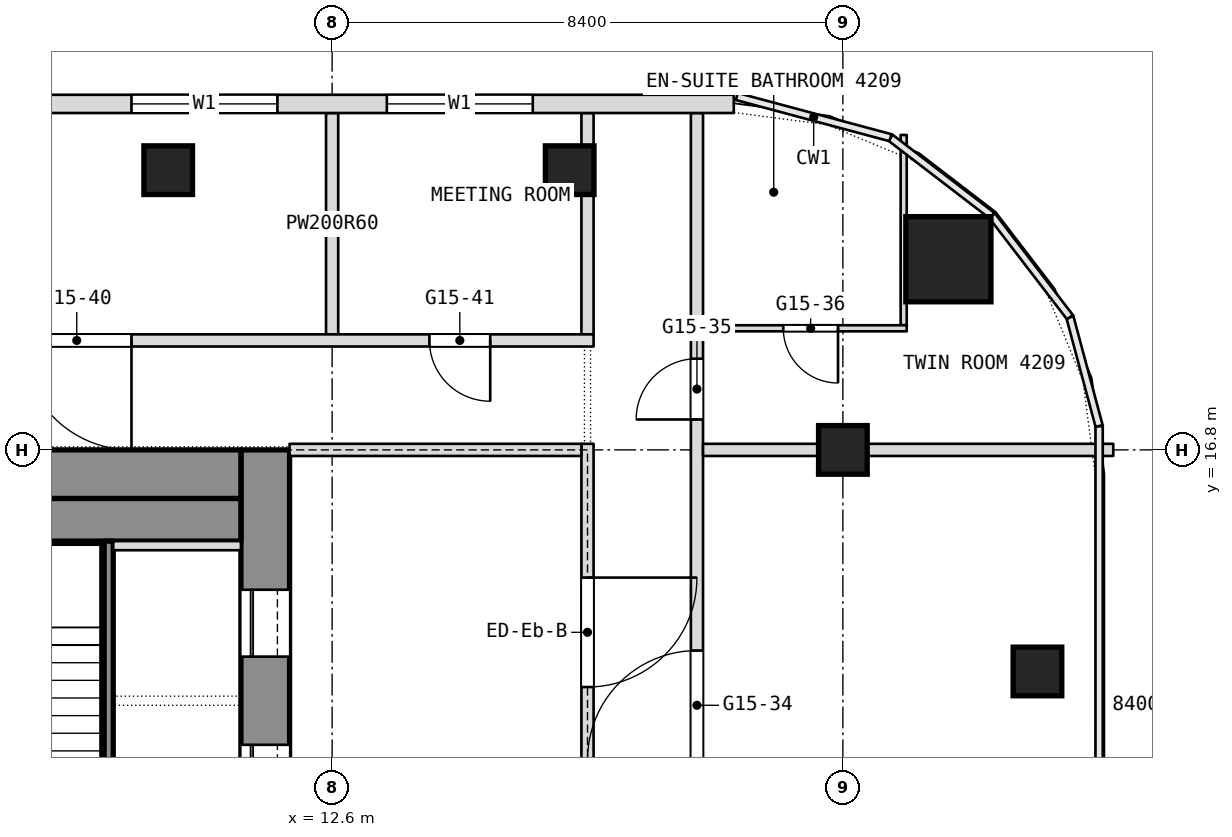
"""IFC4 building model, lengths in metres.
Left out: names, types, materials, properties, quantities, classifications, styles, units other than length and angle.
Written with IfcOpenShell. Run it as: python <this file> out.ifc"""

import sys

from ifc_helpers import new_model, si_unit, direction, frame, frame_2d, origin, origin_2d, place, context, subcontext, project, spatial, rectangle, extrude, element, fill, save


model = new_model("IFC4")
c1 = context("Model", 3, precision=1e-05, world=origin(), true_north=direction((0.0, 1.0)))
c2 = subcontext(c1, "Body", "Model", "MODEL_VIEW")
j1 = project(units=[si_unit("LENGTHUNIT", "METRE"), si_unit("PLANEANGLEUNIT", "RADIAN")], contexts=[c1])
p1 = place(None, origin())
s1 = spatial("IfcSite", under=j1, at=p1, CompositionType="ELEMENT")
p2 = place(p1, origin())
s2 = spatial("IfcBuilding", under=s1, at=p2, CompositionType="ELEMENT")
p3 = place(p2, frame((0.0, 0.0, 187.7)))
s3 = spatial("IfcBuildingStorey", under=s2, at=p3, CompositionType="ELEMENT", Elevation=187.7)
p4 = place(p3, frame((11.5, 0.0, 0.0), z_axis=(0.0, 0.0, 1.0), x_axis=(0.0, 1.0, 0.0)))
e1 = element("IfcWall", 1, at=p4, inside=s3, PredefinedType="SHEAR", context=c2, shape_type="SweptSolid", body=[
    extrude(rectangle(XDim=16.8, YDim=0.8, at=frame_2d((8.4, 0.0))), origin(), (0.0, 0.0, 1.0), 3.6),
])
p5 = place(p4, frame((2.3, 0.0, 0.0)))
e2 = element("IfcOpeningElement", 2, at=p5, cuts=e1, PredefinedType="OPENING", context=c2, shape_type="SweptSolid", body=[
    extrude(rectangle(XDim=1.1, YDim=2.1, at=frame_2d((0.55, 1.05))), frame((0.0, 0.4, 0.0), z_axis=(0.0, -1.0, 0.0), x_axis=(1.0, 0.0, 0.0)), (0.0, 0.0, 1.0), 0.8),
])
p6 = place(p4, frame((4.85, 0.0, 0.0)))
e3 = element("IfcOpeningElement", 3, at=p6, cuts=e1, PredefinedType="OPENING", context=c2, shape_type="SweptSolid", body=[
    extrude(rectangle(XDim=1.1, YDim=2.1, at=frame_2d((0.55, 1.05))), frame((0.0, 0.4, 0.0), z_axis=(0.0, -1.0, 0.0), x_axis=(1.0, 0.0, 0.0)), (0.0, 0.0, 1.0), 0.8),
])
p7 = place(p4, frame((6.825, 0.0, 0.0)))
e4 = element("IfcOpeningElement", 4, at=p7, cuts=e1, PredefinedType="OPENING", context=c2, shape_type="SweptSolid", body=[
    extrude(rectangle(XDim=1.2, YDim=2.1, at=frame_2d((0.6, 1.05))), frame((0.0, 0.4, 0.0), z_axis=(0.0, -1.0, 0.0), x_axis=(1.0, 0.0, 0.0)), (0.0, 0.0, 1.0), 0.8),
])
p8 = place(p4, frame((13.4, 0.0, 0.0)))
e5 = element("IfcOpeningElement", 5, at=p8, cuts=e1, PredefinedType="OPENING", context=c2, shape_type="SweptSolid", body=[
    extrude(rectangle(XDim=1.1, YDim=2.1, at=frame_2d((0.55, 1.05))), frame((0.0, 0.4, 0.0), z_axis=(0.0, -1.0, 0.0), x_axis=(1.0, 0.0, 0.0)), (0.0, 0.0, 1.0), 0.8),
])
p9 = place(p4, frame((10.85, 0.0, 0.0)))
e6 = element("IfcOpeningElement", 6, at=p9, cuts=e1, PredefinedType="OPENING", context=c2, shape_type="SweptSolid", body=[
    extrude(rectangle(XDim=1.1, YDim=2.1, at=frame_2d((0.55, 1.05))), frame((0.0, 0.4, 0.0), z_axis=(0.0, -1.0, 0.0), x_axis=(1.0, 0.0, 0.0)), (0.0, 0.0, 1.0), 0.8),
])
p10 = place(p4, frame((8.775, 0.0, 0.0)))
e7 = element("IfcOpeningElement", 7, at=p10, cuts=e1, PredefinedType="OPENING", context=c2, shape_type="SweptSolid", body=[
    extrude(rectangle(XDim=1.2, YDim=2.1, at=frame_2d((0.6, 1.05))), frame((0.0, 0.4, 0.0), z_axis=(0.0, -1.0, 0.0), x_axis=(1.0, 0.0, 0.0)), (0.0, 0.0, 1.0), 0.8),
])
p11 = place(p3, frame((-11.1, 16.4, 0.0), z_axis=(0.0, 0.0, 1.0), x_axis=(1.0, 0.0, 0.0)))
e8 = element("IfcWall", 8, at=p11, inside=s3, PredefinedType="SHEAR", context=c2, shape_type="SweptSolid", body=[
    extrude(rectangle(XDim=22.2, YDim=0.8, at=frame_2d((11.1, 0.0))), origin(), (0.0, 0.0, 1.0), 3.6),
])
p12 = place(p3, frame((22.736, 19.936, 0.0), z_axis=(0.0, 0.0, 1.0), x_axis=(1.0, 0.0, 0.0)))
e9 = element("IfcColumn", 9, at=p12, inside=s3, PredefinedType="COLUMN", context=c2, shape_type="SweptSolid", body=[
    extrude(rectangle(XDim=1.4, YDim=1.4, at=origin_2d()), origin(), (0.0, 0.0, 1.0), 3.6),
])
for number, where, z_axis, x_axis in (
    (10, (21.0, 16.8, 0.0), (0.0, 0.0, 1.0), (1.0, 0.0, 0.0)),
    (11, (9.904, 21.4, 0.0), (0.0, 0.0, 1.0), (1.0, 0.0, 0.0)),
    (12, (16.507, 21.4, 0.0), (0.0, 0.0, 1.0), (1.0, 0.0, 0.0)),
    (13, (24.2, 13.156, 0.0), (0.0, 0.0, 1.0), (1.0, 0.0, 0.0)),
):
    element("IfcColumn", number, at=place(p3, frame(where, z_axis=z_axis, x_axis=x_axis)), inside=s3, PredefinedType="COLUMN", context=c2, shape_type="SweptSolid", body=[
        extrude(rectangle(XDim=0.8, YDim=0.8, at=origin_2d()), origin(), (0.0, 0.0, 1.0), 3.6),
    ])
p13 = place(p3, frame((22.0, 18.85, 0.0), z_axis=(0.0, 0.0, 1.0), x_axis=(0.0, 1.0, 0.0)))
e14 = element("IfcWall", 14, at=p13, inside=s3, PredefinedType="PARTITIONING", context=c2, shape_type="SweptSolid", body=[
    extrude(rectangle(XDim=3.129, YDim=0.1, at=frame_2d((1.564, 0.0))), origin(), (0.0, 0.0, 1.0), 3.34),
])
p14 = place(p3, frame((18.6, -26.751, 0.0), z_axis=(0.0, 0.0, 1.0), x_axis=(0.0, 1.0, 0.0)))
e15 = element("IfcWall", 15, at=p14, inside=s3, PredefinedType="PARTITIONING", context=c2, shape_type="SweptSolid", body=[
    extrude(rectangle(XDim=49.091, YDim=0.2, at=frame_2d((24.545, 0.0))), origin(), (0.0, 0.0, 1.0), 3.34),
])
p15 = place(p14, frame((3.413, 0.0, 0.0)))
e16 = element("IfcOpeningElement", 16, at=p15, cuts=e15, PredefinedType="OPENING", context=c2, shape_type="SweptSolid", body=[
    extrude(rectangle(XDim=1.0, YDim=2.1, at=frame_2d((0.5, 1.05))), frame((0.0, 0.1, 0.0), z_axis=(0.0, -1.0, 0.0), x_axis=(1.0, 0.0, 0.0)), (0.0, 0.0, 1.0), 0.2),
])
p16 = place(p14, frame((5.838, 0.0, 0.0)))
e17 = element("IfcOpeningElement", 17, at=p16, cuts=e15, PredefinedType="OPENING", context=c2, shape_type="SweptSolid", body=[
    extrude(rectangle(XDim=1.0, YDim=2.1, at=frame_2d((0.5, 1.05))), frame((0.0, 0.1, 0.0), z_axis=(0.0, -1.0, 0.0), x_axis=(1.0, 0.0, 0.0)), (0.0, 0.0, 1.0), 0.2),
])
p17 = place(p14, frame((10.351, 0.0, 0.0)))
e18 = element("IfcOpeningElement", 18, at=p17, cuts=e15, PredefinedType="OPENING", context=c2, shape_type="SweptSolid", body=[
    extrude(rectangle(XDim=1.0, YDim=2.1, at=frame_2d((0.5, 1.05))), frame((0.0, 0.1, 0.0), z_axis=(0.0, -1.0, 0.0), x_axis=(1.0, 0.0, 0.0)), (0.0, 0.0, 1.0), 0.2),
])
p18 = place(p14, frame((16.951, 0.0, 0.0)))
e19 = element("IfcOpeningElement", 19, at=p18, cuts=e15, PredefinedType="OPENING", context=c2, shape_type="SweptSolid", body=[
    extrude(rectangle(XDim=1.0, YDim=2.1, at=frame_2d((0.5, 1.05))), frame((0.0, 0.1, 0.0), z_axis=(0.0, -1.0, 0.0), x_axis=(1.0, 0.0, 0.0)), (0.0, 0.0, 1.0), 0.2),
])
p19 = place(p14, frame((21.151, 0.0, 0.0)))
e20 = element("IfcOpeningElement", 20, at=p19, cuts=e15, PredefinedType="OPENING", context=c2, shape_type="SweptSolid", body=[
    extrude(rectangle(XDim=1.0, YDim=2.1, at=frame_2d((0.5, 1.05))), frame((0.0, 0.1, 0.0), z_axis=(0.0, -1.0, 0.0), x_axis=(1.0, 0.0, 0.0)), (0.0, 0.0, 1.0), 0.2),
])
p20 = place(p14, frame((22.951, 0.0, 0.0)))
e21 = element("IfcOpeningElement", 21, at=p20, cuts=e15, PredefinedType="OPENING", context=c2, shape_type="SweptSolid", body=[
    extrude(rectangle(XDim=1.0, YDim=2.1, at=frame_2d((0.5, 1.05))), frame((0.0, 0.1, 0.0), z_axis=(0.0, -1.0, 0.0), x_axis=(1.0, 0.0, 0.0)), (0.0, 0.0, 1.0), 0.2),
])
p21 = place(p14, frame((27.151, 0.0, 0.0)))
e22 = element("IfcOpeningElement", 22, at=p21, cuts=e15, PredefinedType="OPENING", context=c2, shape_type="SweptSolid", body=[
    extrude(rectangle(XDim=1.0, YDim=2.1, at=frame_2d((0.5, 1.05))), frame((0.0, 0.1, 0.0), z_axis=(0.0, -1.0, 0.0), x_axis=(1.0, 0.0, 0.0)), (0.0, 0.0, 1.0), 0.2),
])
p22 = place(p14, frame((33.751, 0.0, 0.0)))
e23 = element("IfcOpeningElement", 23, at=p22, cuts=e15, PredefinedType="OPENING", context=c2, shape_type="SweptSolid", body=[
    extrude(rectangle(XDim=1.0, YDim=2.1, at=frame_2d((0.5, 1.05))), frame((0.0, 0.1, 0.0), z_axis=(0.0, -1.0, 0.0), x_axis=(1.0, 0.0, 0.0)), (0.0, 0.0, 1.0), 0.2),
])
p23 = place(p14, frame((38.451, 0.0, 0.0)))
e24 = element("IfcOpeningElement", 24, at=p23, cuts=e15, PredefinedType="OPENING", context=c2, shape_type="SweptSolid", body=[
    extrude(rectangle(XDim=1.8, YDim=2.1, at=frame_2d((0.9, 1.05))), frame((0.0, 0.1, 0.0), z_axis=(0.0, -1.0, 0.0), x_axis=(1.0, 0.0, 0.0)), (0.0, 0.0, 1.0), 0.2),
])
p24 = place(p14, frame((44.051, 0.0, 0.0)))
e25 = element("IfcOpeningElement", 25, at=p24, cuts=e15, PredefinedType="OPENING", context=c2, shape_type="SweptSolid", body=[
    extrude(rectangle(XDim=1.0, YDim=2.1, at=frame_2d((0.5, 1.05))), frame((0.0, 0.1, 0.0), z_axis=(0.0, -1.0, 0.0), x_axis=(1.0, 0.0, 0.0)), (0.0, 0.0, 1.0), 0.2),
])
for number, where, z_axis, x_axis in (
    (26, (16.8, 18.7, 0.0), (0.0, 0.0, 1.0), (0.0, 1.0, 0.0)),
    (27, (12.6, 18.7, 0.0), (0.0, 0.0, 1.0), (0.0, 1.0, 0.0)),
):
    element("IfcWall", number, at=place(p3, frame(where, z_axis=z_axis, x_axis=x_axis)), inside=s3, PredefinedType="PARTITIONING", context=c2, shape_type="SweptSolid", body=[
        extrude(rectangle(XDim=3.64, YDim=0.2, at=frame_2d((1.82, 0.0))), origin(), (0.0, 0.0, 1.0), 3.34),
    ])
p25 = place(p3, frame((18.7, 16.8, 0.0), z_axis=(0.0, 0.0, 1.0), x_axis=(1.0, 0.0, 0.0)))
e28 = element("IfcWall", 28, at=p25, inside=s3, PredefinedType="PARTITIONING", context=c2, shape_type="SweptSolid", body=[
    extrude(rectangle(XDim=6.747, YDim=0.2, at=frame_2d((3.374, 0.0))), origin(), (0.0, 0.0, 1.0), 2.94),
])
p26 = place(p3, frame((-16.9, 18.6, 0.0), z_axis=(0.0, 0.0, 1.0), x_axis=(1.0, 0.0, 0.0)))
e29 = element("IfcWall", 29, at=p26, inside=s3, PredefinedType="PARTITIONING", context=c2, shape_type="SweptSolid", body=[
    extrude(rectangle(XDim=33.8, YDim=0.2, at=frame_2d((16.9, 0.0))), origin(), (0.0, 0.0, 1.0), 3.34),
])
p27 = place(p26, frame((1.7, 0.0, 0.0)))
e30 = element("IfcOpeningElement", 30, at=p27, cuts=e29, PredefinedType="OPENING", context=c2, shape_type="SweptSolid", body=[
    extrude(rectangle(XDim=1.0, YDim=2.1, at=frame_2d((0.5, 1.05))), frame((0.0, 0.1, 0.0), z_axis=(0.0, -1.0, 0.0), x_axis=(1.0, 0.0, 0.0)), (0.0, 0.0, 1.0), 0.2),
])
p28 = place(p26, frame((7.6, 0.0, 0.0)))
e31 = element("IfcOpeningElement", 31, at=p28, cuts=e29, PredefinedType="OPENING", context=c2, shape_type="SweptSolid", body=[
    extrude(rectangle(XDim=1.8, YDim=2.1, at=frame_2d((0.9, 1.05))), frame((0.0, 0.1, 0.0), z_axis=(0.0, -1.0, 0.0), x_axis=(1.0, 0.0, 0.0)), (0.0, 0.0, 1.0), 0.2),
])
p29 = place(p26, frame((16.0, 0.0, 0.0)))
e32 = element("IfcOpeningElement", 32, at=p29, cuts=e29, PredefinedType="OPENING", context=c2, shape_type="SweptSolid", body=[
    extrude(rectangle(XDim=1.8, YDim=2.1, at=frame_2d((0.9, 1.05))), frame((0.0, 0.1, 0.0), z_axis=(0.0, -1.0, 0.0), x_axis=(1.0, 0.0, 0.0)), (0.0, 0.0, 1.0), 0.2),
])
p30 = place(p26, frame((24.4, 0.0, 0.0)))
e33 = element("IfcOpeningElement", 33, at=p30, cuts=e29, PredefinedType="OPENING", context=c2, shape_type="SweptSolid", body=[
    extrude(rectangle(XDim=1.8, YDim=2.1, at=frame_2d((0.9, 1.05))), frame((0.0, 0.1, 0.0), z_axis=(0.0, -1.0, 0.0), x_axis=(1.0, 0.0, 0.0)), (0.0, 0.0, 1.0), 0.2),
])
p31 = place(p26, frame((31.1, 0.0, 0.0)))
e34 = element("IfcOpeningElement", 34, at=p31, cuts=e29, PredefinedType="OPENING", context=c2, shape_type="SweptSolid", body=[
    extrude(rectangle(XDim=1.0, YDim=2.1, at=frame_2d((0.5, 1.05))), frame((0.0, 0.1, 0.0), z_axis=(0.0, -1.0, 0.0), x_axis=(1.0, 0.0, 0.0)), (0.0, 0.0, 1.0), 0.2),
])
p32 = place(p3, frame((18.7, 18.8, 0.0), z_axis=(0.0, 0.0, 1.0), x_axis=(1.0, 0.0, 0.0)))
e35 = element("IfcWall", 35, at=p32, inside=s3, PredefinedType="PARTITIONING", context=c2, shape_type="SweptSolid", body=[
    extrude(rectangle(XDim=3.35, YDim=0.1, at=frame_2d((1.675, 0.0))), origin(), (0.0, 0.0, 1.0), 3.34),
])
p33 = place(p32, frame((1.32, 0.0, 0.0)))
e36 = element("IfcOpeningElement", 36, at=p33, cuts=e35, PredefinedType="OPENING", context=c2, shape_type="SweptSolid", body=[
    extrude(rectangle(XDim=0.9, YDim=2.1, at=frame_2d((0.45, 1.05))), frame((0.0, 0.05, 0.0), z_axis=(0.0, -1.0, 0.0), x_axis=(1.0, 0.0, 0.0)), (0.0, 0.0, 1.0), 0.1),
])
p34 = place(p3, frame((19.206, 22.49, 0.0), z_axis=(0.0, 0.0, 1.0), x_axis=(-1.0, 0.0, 0.0)))
e37 = element("IfcWall", 37, at=p34, inside=s3, PredefinedType="NOTDEFINED", context=c2, shape_type="SweptSolid", body=[
    extrude(rectangle(XDim=38.412, YDim=0.3, at=frame_2d((19.206, 0.0))), origin(), (0.0, 0.0, 1.0), 3.6),
])
p35 = place(p34, frame((3.306, 0.0, 0.9)))
e38 = element("IfcOpeningElement", 38, at=p35, cuts=e37, PredefinedType="OPENING", context=c2, shape_type="SweptSolid", body=[
    extrude(rectangle(XDim=2.4, YDim=2.1, at=frame_2d((1.2, 1.05))), frame((0.0, 0.15, 0.0), z_axis=(0.0, -1.0, 0.0), x_axis=(1.0, 0.0, 0.0)), (0.0, 0.0, 1.0), 0.3),
])
p36 = place(p34, frame((7.506, 0.0, 0.9)))
e39 = element("IfcOpeningElement", 39, at=p36, cuts=e37, PredefinedType="OPENING", context=c2, shape_type="SweptSolid", body=[
    extrude(rectangle(XDim=2.4, YDim=2.1, at=frame_2d((1.2, 1.05))), frame((0.0, 0.15, 0.0), z_axis=(0.0, -1.0, 0.0), x_axis=(1.0, 0.0, 0.0)), (0.0, 0.0, 1.0), 0.3),
])
p37 = place(p34, frame((11.706, 0.0, 0.9)))
e40 = element("IfcOpeningElement", 40, at=p37, cuts=e37, PredefinedType="OPENING", context=c2, shape_type="SweptSolid", body=[
    extrude(rectangle(XDim=2.4, YDim=2.1, at=frame_2d((1.2, 1.05))), frame((0.0, 0.15, 0.0), z_axis=(0.0, -1.0, 0.0), x_axis=(1.0, 0.0, 0.0)), (0.0, 0.0, 1.0), 0.3),
])
p38 = place(p34, frame((15.906, 0.0, 0.9)))
e41 = element("IfcOpeningElement", 41, at=p38, cuts=e37, PredefinedType="OPENING", context=c2, shape_type="SweptSolid", body=[
    extrude(rectangle(XDim=2.4, YDim=2.1, at=frame_2d((1.2, 1.05))), frame((0.0, 0.15, 0.0), z_axis=(0.0, -1.0, 0.0), x_axis=(1.0, 0.0, 0.0)), (0.0, 0.0, 1.0), 0.3),
])
p39 = place(p34, frame((20.106, 0.0, 0.9)))
e42 = element("IfcOpeningElement", 42, at=p39, cuts=e37, PredefinedType="OPENING", context=c2, shape_type="SweptSolid", body=[
    extrude(rectangle(XDim=2.4, YDim=2.1, at=frame_2d((1.2, 1.05))), frame((0.0, 0.15, 0.0), z_axis=(0.0, -1.0, 0.0), x_axis=(1.0, 0.0, 0.0)), (0.0, 0.0, 1.0), 0.3),
])
p40 = place(p34, frame((24.306, 0.0, 0.9)))
e43 = element("IfcOpeningElement", 43, at=p40, cuts=e37, PredefinedType="OPENING", context=c2, shape_type="SweptSolid", body=[
    extrude(rectangle(XDim=2.4, YDim=2.1, at=frame_2d((1.2, 1.05))), frame((0.0, 0.15, 0.0), z_axis=(0.0, -1.0, 0.0), x_axis=(1.0, 0.0, 0.0)), (0.0, 0.0, 1.0), 0.3),
])
p41 = place(p34, frame((28.506, 0.0, 0.9)))
e44 = element("IfcOpeningElement", 44, at=p41, cuts=e37, PredefinedType="OPENING", context=c2, shape_type="SweptSolid", body=[
    extrude(rectangle(XDim=2.4, YDim=2.1, at=frame_2d((1.2, 1.05))), frame((0.0, 0.15, 0.0), z_axis=(0.0, -1.0, 0.0), x_axis=(1.0, 0.0, 0.0)), (0.0, 0.0, 1.0), 0.3),
])
p42 = place(p34, frame((32.706, 0.0, 0.9)))
e45 = element("IfcOpeningElement", 45, at=p42, cuts=e37, PredefinedType="OPENING", context=c2, shape_type="SweptSolid", body=[
    extrude(rectangle(XDim=2.4, YDim=2.1, at=frame_2d((1.2, 1.05))), frame((0.0, 0.15, 0.0), z_axis=(0.0, -1.0, 0.0), x_axis=(1.0, 0.0, 0.0)), (0.0, 0.0, 1.0), 0.3),
])
p43 = place(p3, frame((-11.1, 15.65, 0.0), z_axis=(0.0, 0.0, 1.0), x_axis=(1.0, 0.0, 0.0)))
e46 = element("IfcWall", 46, at=p43, inside=s3, PredefinedType="PARTITIONING", context=c2, shape_type="SweptSolid", body=[
    extrude(rectangle(XDim=22.2, YDim=0.7, at=frame_2d((11.1, 0.0))), origin(), (0.0, 0.0, 1.0), 3.34),
])
p44 = place(p3, frame((8.925, 8.7, 0.0), z_axis=(0.0, 0.0, 1.0), x_axis=(0.0, 1.0, 0.0)))
e47 = element("IfcWall", 47, at=p44, inside=s3, PredefinedType="SHEAR", context=c2, shape_type="SweptSolid", body=[
    extrude(rectangle(XDim=6.6, YDim=0.15, at=frame_2d((3.3, 0.0))), origin(), (0.0, 0.0, 1.0), 3.34),
])
p45 = place(p44, frame((0.075, 0.0, 0.0)))
e48 = element("IfcOpeningElement", 48, at=p45, cuts=e47, PredefinedType="OPENING", context=c2, shape_type="SweptSolid", body=[
    extrude(rectangle(XDim=1.2, YDim=2.1, at=frame_2d((0.6, 1.05))), frame((0.0, 0.075, 0.0), z_axis=(0.0, -1.0, 0.0), x_axis=(1.0, 0.0, 0.0)), (0.0, 0.0, 1.0), 0.15),
])
p46 = place(p3, frame((9.0, 15.225, 0.0), z_axis=(0.0, 0.0, 1.0), x_axis=(1.0, 0.0, 0.0)))
e49 = element("IfcWall", 49, at=p46, inside=s3, PredefinedType="SHEAR", context=c2, shape_type="SweptSolid", body=[
    extrude(rectangle(XDim=2.1, YDim=0.15, at=frame_2d((1.05, 0.0))), origin(), (0.0, 0.0, 1.0), 3.6),
])
p47 = place(p3, frame((16.8, -0.1, 0.0), z_axis=(0.0, 0.0, 1.0), x_axis=(0.0, 1.0, 0.0)))
e50 = element("IfcWall", 50, at=p47, inside=s3, PredefinedType="PARTITIONING", context=c2, shape_type="SweptSolid", body=[
    extrude(rectangle(XDim=17.0, YDim=0.2, at=frame_2d((8.5, 0.0))), origin(), (0.0, 0.0, 1.0), 3.34),
])
p48 = place(p47, frame((2.2, 0.0, 0.0)))
e51 = element("IfcOpeningElement", 51, at=p48, cuts=e50, PredefinedType="OPENING", context=c2, shape_type="SweptSolid", body=[
    extrude(rectangle(XDim=1.8, YDim=2.1, at=frame_2d((0.9, 1.05))), frame((0.0, 0.1, 0.0), z_axis=(0.0, -1.0, 0.0), x_axis=(1.0, 0.0, 0.0)), (0.0, 0.0, 1.0), 0.2),
])
p49 = place(p47, frame((13.0, 0.0, 0.0)))
e52 = element("IfcOpeningElement", 52, at=p49, cuts=e50, PredefinedType="OPENING", context=c2, shape_type="SweptSolid", body=[
    extrude(rectangle(XDim=1.8, YDim=2.1, at=frame_2d((0.9, 1.05))), frame((0.0, 0.1, 0.0), z_axis=(0.0, -1.0, 0.0), x_axis=(1.0, 0.0, 0.0)), (0.0, 0.0, 1.0), 0.2),
])
p50 = place(p3, frame((11.9, 16.8, 0.0), z_axis=(0.0, 0.0, 1.0), x_axis=(1.0, 0.0, 0.0)))
e53 = element("IfcWall", 53, at=p50, inside=s3, PredefinedType="PARTITIONING", context=c2, shape_type="SweptSolid", body=[
    extrude(rectangle(XDim=4.8, YDim=0.2, at=frame_2d((2.4, 0.0))), origin(), (0.0, 0.0, 1.0), 2.94),
])
p51 = place(p23, origin())
e54 = element("IfcDoor", 54, at=p51, inside=s3, OperationType="DOUBLE_DOOR_SINGLE_SWING", PredefinedType="DOOR", context=c2, shape_type="SweptSolid", body=[
    extrude(rectangle(XDim=1.8, YDim=2.1, at=frame_2d((0.9, 1.05))), frame((0.0, 0.025, 0.0), z_axis=(0.0, -1.0, 0.0), x_axis=(1.0, 0.0, 0.0)), (0.0, 0.0, 1.0), 0.05),
])
fill(e24, e54)
p52 = place(p24, origin())
e55 = element("IfcDoor", 55, at=p52, inside=s3, OperationType="SINGLE_SWING_LEFT", PredefinedType="DOOR", context=c2, shape_type="SweptSolid", body=[
    extrude(rectangle(XDim=1.0, YDim=2.1, at=frame_2d((0.5, 1.05))), frame((0.0, 0.025, 0.0), z_axis=(0.0, -1.0, 0.0), x_axis=(1.0, 0.0, 0.0)), (0.0, 0.0, 1.0), 0.05),
])
fill(e25, e55)
p53 = place(p30, origin())
e56 = element("IfcDoor", 56, at=p53, inside=s3, OperationType="DOUBLE_DOOR_SINGLE_SWING", PredefinedType="DOOR", context=c2, shape_type="SweptSolid", body=[
    extrude(rectangle(XDim=1.8, YDim=2.1, at=frame_2d((0.9, 1.05))), frame((0.0, 0.025, 0.0), z_axis=(0.0, -1.0, 0.0), x_axis=(1.0, 0.0, 0.0)), (0.0, 0.0, 1.0), 0.05),
])
fill(e33, e56)
p54 = place(p31, origin())
e57 = element("IfcDoor", 57, at=p54, inside=s3, OperationType="SINGLE_SWING_LEFT", PredefinedType="DOOR", context=c2, shape_type="SweptSolid", body=[
    extrude(rectangle(XDim=1.0, YDim=2.1, at=frame_2d((0.5, 1.05))), frame((0.0, 0.025, 0.0), z_axis=(0.0, -1.0, 0.0), x_axis=(1.0, 0.0, 0.0)), (0.0, 0.0, 1.0), 0.05),
])
fill(e34, e57)
p55 = place(p33, origin())
e58 = element("IfcDoor", 58, at=p55, inside=s3, OperationType="SINGLE_SWING_RIGHT", PredefinedType="DOOR", context=c2, shape_type="SweptSolid", body=[
    extrude(rectangle(XDim=0.9, YDim=2.1, at=frame_2d((0.45, 1.05))), frame((0.0, 0.025, 0.0), z_axis=(0.0, -1.0, 0.0), x_axis=(1.0, 0.0, 0.0)), (0.0, 0.0, 1.0), 0.05),
])
fill(e36, e58)
p56 = place(p35, origin())
e59 = element("IfcWindow", 59, at=p56, inside=s3, PartitioningType="SINGLE_PANEL", PredefinedType="WINDOW", context=c2, shape_type="SweptSolid", body=[
    extrude(rectangle(XDim=2.4, YDim=2.1, at=frame_2d((1.2, 1.05))), frame((0.0, 0.03, 0.0), z_axis=(0.0, -1.0, 0.0), x_axis=(1.0, 0.0, 0.0)), (0.0, 0.0, 1.0), 0.06),
])
fill(e38, e59)
p57 = place(p36, origin())
e60 = element("IfcWindow", 60, at=p57, inside=s3, PartitioningType="SINGLE_PANEL", PredefinedType="WINDOW", context=c2, shape_type="SweptSolid", body=[
    extrude(rectangle(XDim=2.4, YDim=2.1, at=frame_2d((1.2, 1.05))), frame((0.0, 0.03, 0.0), z_axis=(0.0, -1.0, 0.0), x_axis=(1.0, 0.0, 0.0)), (0.0, 0.0, 1.0), 0.06),
])
fill(e39, e60)
p58 = place(p8, origin())
e61 = element("IfcDoor", 61, at=p58, inside=s3, OperationType="SLIDING_TO_LEFT", PredefinedType="DOOR", context=c2, shape_type="SweptSolid", body=[
    extrude(rectangle(XDim=1.1, YDim=2.1, at=frame_2d((0.55, 1.05))), frame((0.0, 0.025, 0.0), z_axis=(0.0, -1.0, 0.0), x_axis=(1.0, 0.0, 0.0)), (0.0, 0.0, 1.0), 0.05),
])
fill(e5, e61)
p59 = place(p9, origin())
e62 = element("IfcDoor", 62, at=p59, inside=s3, OperationType="SLIDING_TO_LEFT", PredefinedType="DOOR", context=c2, shape_type="SweptSolid", body=[
    extrude(rectangle(XDim=1.1, YDim=2.1, at=frame_2d((0.55, 1.05))), frame((0.0, 0.025, 0.0), z_axis=(0.0, -1.0, 0.0), x_axis=(1.0, 0.0, 0.0)), (0.0, 0.0, 1.0), 0.05),
])
fill(e6, e62)
p60 = place(p49, origin())
e63 = element("IfcDoor", 63, at=p60, inside=s3, OperationType="DOUBLE_DOOR_SINGLE_SWING", PredefinedType="DOOR", context=c2, shape_type="SweptSolid", body=[
    extrude(rectangle(XDim=1.8, YDim=2.1, at=frame_2d((0.9, 1.05))), frame((0.0, 0.025, 0.0), z_axis=(0.0, -1.0, 0.0), x_axis=(1.0, 0.0, 0.0)), (0.0, 0.0, 1.0), 0.05),
])
fill(e52, e63)
save(model, sys.argv[1])
